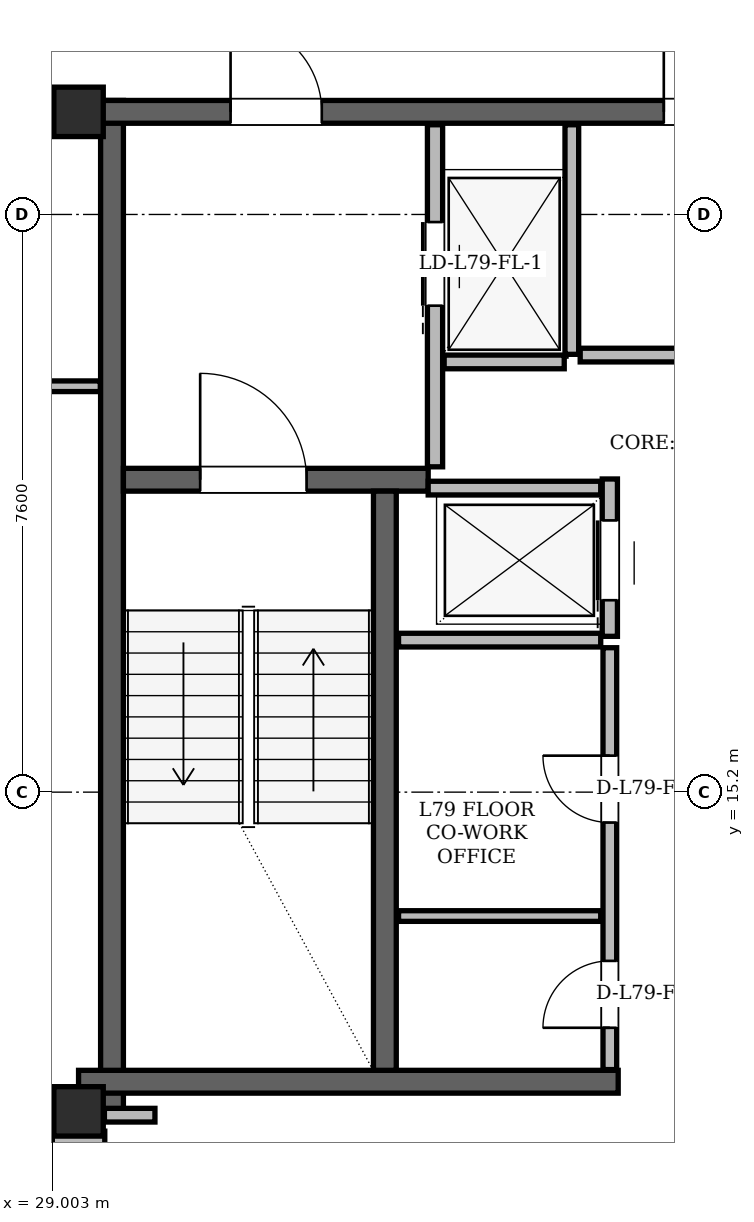
"""IFC4 building model, lengths in metres.
Left out: names, types, materials, properties, quantities, classifications, styles, units other than length and angle.
Written with IfcOpenShell. Run it as: python <this file> out.ifc"""

import sys

from ifc_helpers import new_model, si_unit, direction, frame, frame_2d, origin, origin_2d, place, context, subcontext, project, spatial, rectangle, hollow_rectangle, extrude, element, fill, save


model = new_model("IFC4")
c1 = context("Model", 3, precision=1e-05, world=origin(), true_north=direction((0.0, 1.0)))
c2 = subcontext(c1, "Body", "Model", "MODEL_VIEW")
j1 = project(units=[si_unit("LENGTHUNIT", "METRE"), si_unit("PLANEANGLEUNIT", "RADIAN")], contexts=[c1])
p1 = place(None, origin())
s1 = spatial("IfcSite", under=j1, at=p1, CompositionType="ELEMENT")
p2 = place(p1, origin())
s2 = spatial("IfcBuilding", under=s1, at=p2, CompositionType="ELEMENT")
p3 = place(p2, frame((0.0, 0.0, 301.2)))
s3 = spatial("IfcBuildingStorey", under=s2, at=p3, CompositionType="ELEMENT", Elevation=301.2)
for number, where, z_axis, x_axis in (
    (1, (29.35, 11.0, 0.0), (0.0, 0.0, 1.0), (1.0, 0.0, 0.0)),
    (2, (29.35, 24.15, 0.0), (0.0, 0.0, 1.0), (1.0, 0.0, 0.0)),
):
    element("IfcColumn", number, at=place(p3, frame(where, z_axis=z_axis, x_axis=x_axis)), inside=s3, PredefinedType="COLUMN", context=c2, shape_type="SweptSolid", body=[
        extrude(hollow_rectangle(XDim=0.65, YDim=0.65, WallThickness=0.05, at=origin_2d()), origin(), (0.0, 0.0, 1.0), 3.9),
    ])
p4 = place(p3, frame((29.79, 11.0, 0.0), z_axis=(0.0, 0.0, 1.0), x_axis=(0.0, 1.0, 0.0)))
e3 = element("IfcWall", 3, at=p4, inside=s3, PredefinedType="SHEAR", context=c2, shape_type="SweptSolid", body=[
    extrude(rectangle(XDim=13.3, YDim=0.3, at=frame_2d((6.65, 0.0))), origin(), (0.0, 0.0, 1.0), 3.68),
])
p5 = place(p3, frame((29.35, 11.39, 0.0), z_axis=(0.0, 0.0, 1.0), x_axis=(1.0, 0.0, 0.0)))
e4 = element("IfcWall", 4, at=p5, inside=s3, PredefinedType="SHEAR", context=c2, shape_type="SweptSolid", body=[
    extrude(rectangle(XDim=7.1, YDim=0.3, at=frame_2d((3.55, 0.0))), origin(), (0.0, 0.0, 1.0), 3.68),
])
p6 = place(p3, frame((29.65, 24.15, 0.0), z_axis=(0.0, 0.0, 1.0), x_axis=(1.0, 0.0, 0.0)))
e5 = element("IfcWall", 5, at=p6, inside=s3, PredefinedType="SHEAR", context=c2, shape_type="SweptSolid", body=[
    extrude(rectangle(XDim=15.7, YDim=0.3, at=frame_2d((7.85, 0.0))), origin(), (0.0, 0.0, 1.0), 3.68),
])
p7 = place(p6, frame((1.7, 0.0, 0.0)))
e6 = element("IfcOpeningElement", 6, at=p7, cuts=e5, PredefinedType="OPENING", context=c2, shape_type="SweptSolid", body=[
    extrude(rectangle(XDim=1.2, YDim=2.2, at=frame_2d((0.6, 1.1))), frame((0.0, 0.15, 0.0), z_axis=(0.0, -1.0, 0.0), x_axis=(1.0, 0.0, 0.0)), (0.0, 0.0, 1.0), 0.3),
])
p8 = place(p6, frame((12.8, 0.0, 0.0)))
e7 = element("IfcOpeningElement", 7, at=p8, cuts=e5, PredefinedType="OPENING", context=c2, shape_type="SweptSolid", body=[
    extrude(rectangle(XDim=1.2, YDim=2.2, at=frame_2d((0.6, 1.1))), frame((0.0, 0.15, 0.0), z_axis=(0.0, -1.0, 0.0), x_axis=(1.0, 0.0, 0.0)), (0.0, 0.0, 1.0), 0.3),
])
p9 = place(p6, frame((7.4, 0.0, 0.0)))
e8 = element("IfcOpeningElement", 8, at=p9, cuts=e5, PredefinedType="OPENING", context=c2, shape_type="SweptSolid", body=[
    extrude(rectangle(XDim=0.9, YDim=2.05, at=frame_2d((0.45, 1.025))), frame((0.0, 0.15, 0.0), z_axis=(0.0, -1.0, 0.0), x_axis=(1.0, 0.0, 0.0)), (0.0, 0.0, 1.0), 0.3),
])
p10 = place(p3, frame((29.94, 19.31, 0.0), z_axis=(0.0, 0.0, 1.0), x_axis=(1.0, 0.0, 0.0)))
e9 = element("IfcWall", 9, at=p10, inside=s3, PredefinedType="SHEAR", context=c2, shape_type="SweptSolid", body=[
    extrude(rectangle(XDim=4.01, YDim=0.3, at=frame_2d((2.005, 0.0))), origin(), (0.0, 0.0, 1.0), 3.68),
])
p11 = place(p10, frame((1.01, 0.0, 0.0)))
e10 = element("IfcOpeningElement", 10, at=p11, cuts=e9, PredefinedType="OPENING", context=c2, shape_type="SweptSolid", body=[
    extrude(rectangle(XDim=1.4, YDim=2.2, at=frame_2d((0.7, 1.1))), frame((0.0, 0.15, 0.0), z_axis=(0.0, -1.0, 0.0), x_axis=(1.0, 0.0, 0.0)), (0.0, 0.0, 1.0), 0.3),
])
p12 = place(p3, frame((33.38, 11.54, 0.0), z_axis=(0.0, 0.0, 1.0), x_axis=(0.0, 1.0, 0.0)))
e11 = element("IfcWall", 11, at=p12, inside=s3, PredefinedType="SHEAR", context=c2, shape_type="SweptSolid", body=[
    extrude(rectangle(XDim=7.62, YDim=0.3, at=frame_2d((3.81, 0.0))), origin(), (0.0, 0.0, 1.0), 3.68),
])
p13 = place(p3, frame((35.568, 42.958, 0.0), z_axis=(0.0, 0.0, 1.0), x_axis=(-0.499999872078, -0.86602547764, 0.0)))
e12 = element("IfcWall", 12, at=p13, inside=s3, PredefinedType="SOLIDWALL", context=c2, shape_type="SweptSolid", body=[
    extrude(rectangle(XDim=37.658, YDim=0.29, at=frame_2d((18.829, 0.0))), origin(), (0.0, 0.0, 1.0), 3.058),
])
p14 = place(p13, frame((8.034, 0.0, 0.0)))
e13 = element("IfcOpeningElement", 13, at=p14, cuts=e12, PredefinedType="OPENING", context=c2, shape_type="SweptSolid", body=[
    extrude(rectangle(XDim=1.5, YDim=2.2, at=frame_2d((0.75, 1.1))), frame((0.0, 0.145, 0.0), z_axis=(0.0, -1.0, 0.0), x_axis=(1.0, 0.0, 0.0)), (0.0, 0.0, 1.0), 0.29),
])
p15 = place(p13, frame((32.518, 0.0, 0.0)))
e14 = element("IfcOpeningElement", 14, at=p15, cuts=e12, PredefinedType="OPENING", context=c2, shape_type="SweptSolid", body=[
    extrude(rectangle(XDim=1.5, YDim=2.2, at=frame_2d((0.75, 1.1))), frame((0.0, 0.145, 0.0), z_axis=(0.0, -1.0, 0.0), x_axis=(1.0, 0.0, 0.0)), (0.0, 0.0, 1.0), 0.29),
])
p16 = place(p13, frame((27.303, 0.0, 0.85)))
e15 = element("IfcOpeningElement", 15, at=p16, cuts=e12, PredefinedType="OPENING", context=c2, shape_type="SweptSolid", body=[
    extrude(rectangle(XDim=2.2, YDim=1.85, at=frame_2d((1.1, 0.925))), frame((0.0, 0.145, 0.0), z_axis=(0.0, -1.0, 0.0), x_axis=(1.0, 0.0, 0.0)), (0.0, 0.0, 1.0), 0.29),
])
p17 = place(p13, frame((34.437, 0.0, 0.85)))
e16 = element("IfcOpeningElement", 16, at=p17, cuts=e12, PredefinedType="OPENING", context=c2, shape_type="SweptSolid", body=[
    extrude(rectangle(XDim=1.6, YDim=1.7, at=frame_2d((0.8, 0.85))), frame((0.0, 0.145, 0.0), z_axis=(0.0, -1.0, 0.0), x_axis=(1.0, 0.0, 0.0)), (0.0, 0.0, 1.0), 0.29),
])
p18 = place(p13, frame((21.655, 0.0, 0.85)))
e17 = element("IfcOpeningElement", 17, at=p18, cuts=e12, PredefinedType="OPENING", context=c2, shape_type="SweptSolid", body=[
    extrude(rectangle(XDim=1.2, YDim=1.48, at=frame_2d((0.6, 0.74))), frame((0.0, 0.145, 0.0), z_axis=(0.0, -1.0, 0.0), x_axis=(1.0, 0.0, 0.0)), (0.0, 0.0, 1.0), 0.29),
])
p19 = place(p13, frame((23.901, 0.0, 0.85)))
e18 = element("IfcOpeningElement", 18, at=p19, cuts=e12, PredefinedType="OPENING", context=c2, shape_type="SweptSolid", body=[
    extrude(rectangle(XDim=1.4, YDim=1.6, at=frame_2d((0.7, 0.8))), frame((0.0, 0.145, 0.0), z_axis=(0.0, -1.0, 0.0), x_axis=(1.0, 0.0, 0.0)), (0.0, 0.0, 1.0), 0.29),
])
p20 = place(p13, frame((15.246, 0.0, 0.85)))
e19 = element("IfcOpeningElement", 19, at=p20, cuts=e12, PredefinedType="OPENING", context=c2, shape_type="SweptSolid", body=[
    extrude(rectangle(XDim=2.6, YDim=1.95, at=frame_2d((1.3, 0.975))), frame((0.0, 0.145, 0.0), z_axis=(0.0, -1.0, 0.0), x_axis=(1.0, 0.0, 0.0)), (0.0, 0.0, 1.0), 0.29),
])
p21 = place(p13, frame((1.164, 0.0, 0.85)))
e20 = element("IfcOpeningElement", 20, at=p21, cuts=e12, PredefinedType="OPENING", context=c2, shape_type="SweptSolid", body=[
    extrude(rectangle(XDim=1.2, YDim=1.48, at=frame_2d((0.6, 0.74))), frame((0.0, 0.145, 0.0), z_axis=(0.0, -1.0, 0.0), x_axis=(1.0, 0.0, 0.0)), (0.0, 0.0, 1.0), 0.29),
])
p22 = place(p3, frame((34.04, 19.48, 0.0), z_axis=(0.0, 0.0, 1.0), x_axis=(0.0, 1.0, 0.0)))
e21 = element("IfcWall", 21, at=p22, inside=s3, PredefinedType="PARTITIONING", context=c2, shape_type="SweptSolid", body=[
    extrude(rectangle(XDim=4.5, YDim=0.2, at=frame_2d((2.25, 0.0))), origin(), (0.0, 0.0, 1.0), 3.68),
])
p23 = place(p22, frame((2.12, 0.0, 0.0)))
e22 = element("IfcOpeningElement", 22, at=p23, cuts=e21, PredefinedType="OPENING", context=c2, shape_type="SweptSolid", body=[
    extrude(rectangle(XDim=1.1, YDim=2.2, at=frame_2d((0.55, 1.1))), frame((0.0, 0.1, 0.0), z_axis=(0.0, -1.0, 0.0), x_axis=(1.0, 0.0, 0.0)), (0.0, 0.0, 1.0), 0.2),
])
p24 = place(p3, frame((35.84, 20.96, 0.0), z_axis=(0.0, 0.0, 1.0), x_axis=(0.0, 1.0, 0.0)))
e23 = element("IfcWall", 23, at=p24, inside=s3, PredefinedType="PARTITIONING", context=c2, shape_type="SweptSolid", body=[
    extrude(rectangle(XDim=3.02, YDim=0.18, at=frame_2d((1.51, 0.0))), origin(), (0.0, 0.0, 1.0), 3.68),
])
p25 = place(p3, frame((34.16, 20.86, 0.0), z_axis=(0.0, 0.0, 1.0), x_axis=(1.0, 0.0, 0.0)))
e24 = element("IfcWall", 24, at=p25, inside=s3, PredefinedType="PARTITIONING", context=c2, shape_type="SweptSolid", body=[
    extrude(rectangle(XDim=1.58, YDim=0.18, at=frame_2d((0.79, 0.0))), origin(), (0.0, 0.0, 1.0), 3.68),
])
p26 = place(p3, frame((36.34, 17.25, 0.0), z_axis=(0.0, 0.0, 1.0), x_axis=(0.0, 1.0, 0.0)))
e25 = element("IfcWall", 25, at=p26, inside=s3, PredefinedType="PARTITIONING", context=c2, shape_type="SweptSolid", body=[
    extrude(rectangle(XDim=2.07, YDim=0.2, at=frame_2d((1.035, 0.0))), origin(), (0.0, 0.0, 1.0), 3.68),
])
p27 = place(p26, frame((0.475, 0.0, 0.0)))
e26 = element("IfcOpeningElement", 26, at=p27, cuts=e25, PredefinedType="OPENING", context=c2, shape_type="SweptSolid", body=[
    extrude(rectangle(XDim=1.05, YDim=2.15, at=frame_2d((0.525, 1.075))), frame((0.0, 0.1, 0.0), z_axis=(0.0, -1.0, 0.0), x_axis=(1.0, 0.0, 0.0)), (0.0, 0.0, 1.0), 0.2),
])
p28 = place(p3, frame((33.95, 19.2, 0.0), z_axis=(0.0, 0.0, 1.0), x_axis=(1.0, 0.0, 0.0)))
e27 = element("IfcWall", 27, at=p28, inside=s3, PredefinedType="PARTITIONING", context=c2, shape_type="SweptSolid", body=[
    extrude(rectangle(XDim=2.27, YDim=0.18, at=frame_2d((1.135, 0.0))), origin(), (0.0, 0.0, 1.0), 3.68),
])
p29 = place(p3, frame((33.56, 17.2, 0.0), z_axis=(0.0, 0.0, 1.0), x_axis=(1.0, 0.0, 0.0)))
e28 = element("IfcWall", 28, at=p29, inside=s3, PredefinedType="PARTITIONING", context=c2, shape_type="SweptSolid", body=[
    extrude(rectangle(XDim=2.66, YDim=0.18, at=frame_2d((1.33, 0.0))), origin(), (0.0, 0.0, 1.0), 3.68),
])
p30 = place(p3, frame((36.34, 11.55, 0.0), z_axis=(0.0, 0.0, 1.0), x_axis=(0.0, 1.0, 0.0)))
e29 = element("IfcWall", 29, at=p30, inside=s3, PredefinedType="PARTITIONING", context=c2, shape_type="SweptSolid", body=[
    extrude(rectangle(XDim=5.55, YDim=0.18, at=frame_2d((2.775, 0.0))), origin(), (0.0, 0.0, 1.0), 3.68),
])
p31 = place(p30, frame((0.55, 0.0, 0.0)))
e30 = element("IfcOpeningElement", 30, at=p31, cuts=e29, PredefinedType="OPENING", context=c2, shape_type="SweptSolid", body=[
    extrude(rectangle(XDim=0.88, YDim=2.08, at=frame_2d((0.44, 1.04))), frame((0.0, 0.09, 0.0), z_axis=(0.0, -1.0, 0.0), x_axis=(1.0, 0.0, 0.0)), (0.0, 0.0, 1.0), 0.18),
])
p32 = place(p30, frame((3.25, 0.0, 0.0)))
e31 = element("IfcOpeningElement", 31, at=p32, cuts=e29, PredefinedType="OPENING", context=c2, shape_type="SweptSolid", body=[
    extrude(rectangle(XDim=0.88, YDim=2.08, at=frame_2d((0.44, 1.04))), frame((0.0, 0.09, 0.0), z_axis=(0.0, -1.0, 0.0), x_axis=(1.0, 0.0, 0.0)), (0.0, 0.0, 1.0), 0.18),
])
p33 = place(p3, frame((33.56, 13.57, 0.0), z_axis=(0.0, 0.0, 1.0), x_axis=(1.0, 0.0, 0.0)))
e32 = element("IfcWall", 32, at=p33, inside=s3, PredefinedType="PARTITIONING", context=c2, shape_type="SweptSolid", body=[
    extrude(rectangle(XDim=2.66, YDim=0.14, at=frame_2d((1.33, 0.0))), origin(), (0.0, 0.0, 1.0), 3.68),
])
p34 = place(p3, frame((35.95, 20.95, 0.0), z_axis=(0.0, 0.0, 1.0), x_axis=(1.0, 0.0, 0.0)))
e33 = element("IfcWall", 33, at=p34, inside=s3, PredefinedType="PARTITIONING", context=c2, shape_type="SweptSolid", body=[
    extrude(rectangle(XDim=3.1, YDim=0.18, at=frame_2d((1.55, 0.0))), origin(), (0.0, 0.0, 1.0), 3.68),
])
p35 = place(p3, frame((29.005, 10.65, 0.0), z_axis=(0.0, 0.0, 1.0), x_axis=(1.0, 0.0, 0.0)))
e34 = element("IfcWall", 34, at=p35, inside=s3, PredefinedType="PARTITIONING", context=c2, shape_type="SweptSolid", body=[
    extrude(rectangle(XDim=0.69, YDim=0.18, at=frame_2d((0.345, 0.0))), origin(), (0.0, 0.0, 1.0), 3.68),
])
p36 = place(p3, frame((25.6, 10.95, 0.0), z_axis=(0.0, 0.0, 1.0), x_axis=(1.0, 0.0, 0.0)))
e35 = element("IfcWall", 35, at=p36, inside=s3, PredefinedType="PARTITIONING", context=c2, shape_type="SweptSolid", body=[
    extrude(rectangle(XDim=3.41, YDim=0.18, at=frame_2d((1.705, 0.0))), origin(), (0.0, 0.0, 1.0), 3.266),
])
p37 = place(p3, frame((29.69, 10.95, 0.0), z_axis=(0.0, 0.0, 1.0), x_axis=(1.0, 0.0, 0.0)))
e36 = element("IfcWall", 36, at=p37, inside=s3, PredefinedType="PARTITIONING", context=c2, shape_type="SweptSolid", body=[
    extrude(rectangle(XDim=0.665, YDim=0.18, at=frame_2d((0.333, 0.0))), origin(), (0.0, 0.0, 1.0), 2.82),
])
p38 = place(p3, frame((22.797, 20.54, 0.0), z_axis=(0.0, 0.0, 1.0), x_axis=(1.0, 0.0, 0.0)))
e37 = element("IfcWall", 37, at=p38, inside=s3, PredefinedType="PARTITIONING", context=c2, shape_type="SweptSolid", body=[
    extrude(rectangle(XDim=6.839, YDim=0.14, at=frame_2d((3.419, 0.0))), origin(), (0.0, 0.0, 1.0), 2.82),
])
p39 = place(p38, frame((2.952, 0.0, 0.0)))
e38 = element("IfcOpeningElement", 38, at=p39, cuts=e37, PredefinedType="OPENING", context=c2, shape_type="SweptSolid", body=[
    extrude(rectangle(XDim=0.88, YDim=2.08, at=frame_2d((0.44, 1.04))), frame((0.0, 0.07, 0.0), z_axis=(0.0, -1.0, 0.0), x_axis=(1.0, 0.0, 0.0)), (0.0, 0.0, 1.0), 0.14),
])
p40 = place(p3, frame((24.979, 24.32, 0.0), z_axis=(0.0, 0.0, 1.0), x_axis=(1.0, 0.0, 0.0)))
e39 = element("IfcWall", 39, at=p40, inside=s3, PredefinedType="PARTITIONING", context=c2, shape_type="SweptSolid", body=[
    extrude(rectangle(XDim=4.031, YDim=0.18, at=frame_2d((2.015, 0.0))), origin(), (0.0, 0.0, 1.0), 3.68),
])
p41 = place(p31, origin())
e40 = element("IfcDoor", 40, at=p41, inside=s3, OperationType="SINGLE_SWING_LEFT", PredefinedType="DOOR", context=c2, shape_type="SweptSolid", body=[
    extrude(rectangle(XDim=0.88, YDim=2.08, at=frame_2d((0.44, 1.04))), frame((0.0, 0.025, 0.0), z_axis=(0.0, -1.0, 0.0), x_axis=(1.0, 0.0, 0.0)), (0.0, 0.0, 1.0), 0.05),
])
fill(e30, e40)
p42 = place(p32, origin())
e41 = element("IfcDoor", 41, at=p42, inside=s3, OperationType="SINGLE_SWING_RIGHT", PredefinedType="DOOR", context=c2, shape_type="SweptSolid", body=[
    extrude(rectangle(XDim=0.88, YDim=2.08, at=frame_2d((0.44, 1.04))), frame((0.0, 0.025, 0.0), z_axis=(0.0, -1.0, 0.0), x_axis=(1.0, 0.0, 0.0)), (0.0, 0.0, 1.0), 0.05),
])
fill(e31, e41)
p43 = place(p23, origin())
e42 = element("IfcDoor", 42, at=p43, inside=s3, OperationType="SLIDING_TO_LEFT", PredefinedType="DOOR", context=c2, shape_type="SweptSolid", body=[
    extrude(rectangle(XDim=1.1, YDim=2.2, at=frame_2d((0.55, 1.1))), frame((0.0, 0.025, 0.0), z_axis=(0.0, -1.0, 0.0), x_axis=(1.0, 0.0, 0.0)), (0.0, 0.0, 1.0), 0.05),
])
fill(e22, e42)
p44 = place(p27, origin())
e43 = element("IfcDoor", 43, at=p44, inside=s3, OperationType="SLIDING_TO_LEFT", PredefinedType="DOOR", context=c2, shape_type="SweptSolid", body=[
    extrude(rectangle(XDim=1.05, YDim=2.15, at=frame_2d((0.525, 1.075))), frame((0.0, 0.025, 0.0), z_axis=(0.0, -1.0, 0.0), x_axis=(1.0, 0.0, 0.0)), (0.0, 0.0, 1.0), 0.05),
])
fill(e26, e43)
p45 = place(p11, origin())
e44 = element("IfcDoor", 44, at=p45, inside=s3, OperationType="SINGLE_SWING_LEFT", PredefinedType="DOOR", context=c2, shape_type="SweptSolid", body=[
    extrude(rectangle(XDim=1.4, YDim=2.2, at=frame_2d((0.7, 1.1))), frame((0.0, 0.025, 0.0), z_axis=(0.0, -1.0, 0.0), x_axis=(1.0, 0.0, 0.0)), (0.0, 0.0, 1.0), 0.05),
])
fill(e10, e44)
p46 = place(p7, origin())
e45 = element("IfcDoor", 45, at=p46, inside=s3, OperationType="SINGLE_SWING_LEFT", PredefinedType="DOOR", context=c2, shape_type="SweptSolid", body=[
    extrude(rectangle(XDim=1.2, YDim=2.2, at=frame_2d((0.6, 1.1))), frame((0.0, 0.025, 0.0), z_axis=(0.0, -1.0, 0.0), x_axis=(1.0, 0.0, 0.0)), (0.0, 0.0, 1.0), 0.05),
])
fill(e6, e45)
p47 = place(p9, origin())
e46 = element("IfcDoor", 46, at=p47, inside=s3, OperationType="SINGLE_SWING_LEFT", PredefinedType="DOOR", context=c2, shape_type="SweptSolid", body=[
    extrude(rectangle(XDim=0.9, YDim=2.05, at=frame_2d((0.45, 1.025))), frame((0.0, 0.025, 0.0), z_axis=(0.0, -1.0, 0.0), x_axis=(1.0, 0.0, 0.0)), (0.0, 0.0, 1.0), 0.05),
])
fill(e8, e46)
save(model, sys.argv[1])
